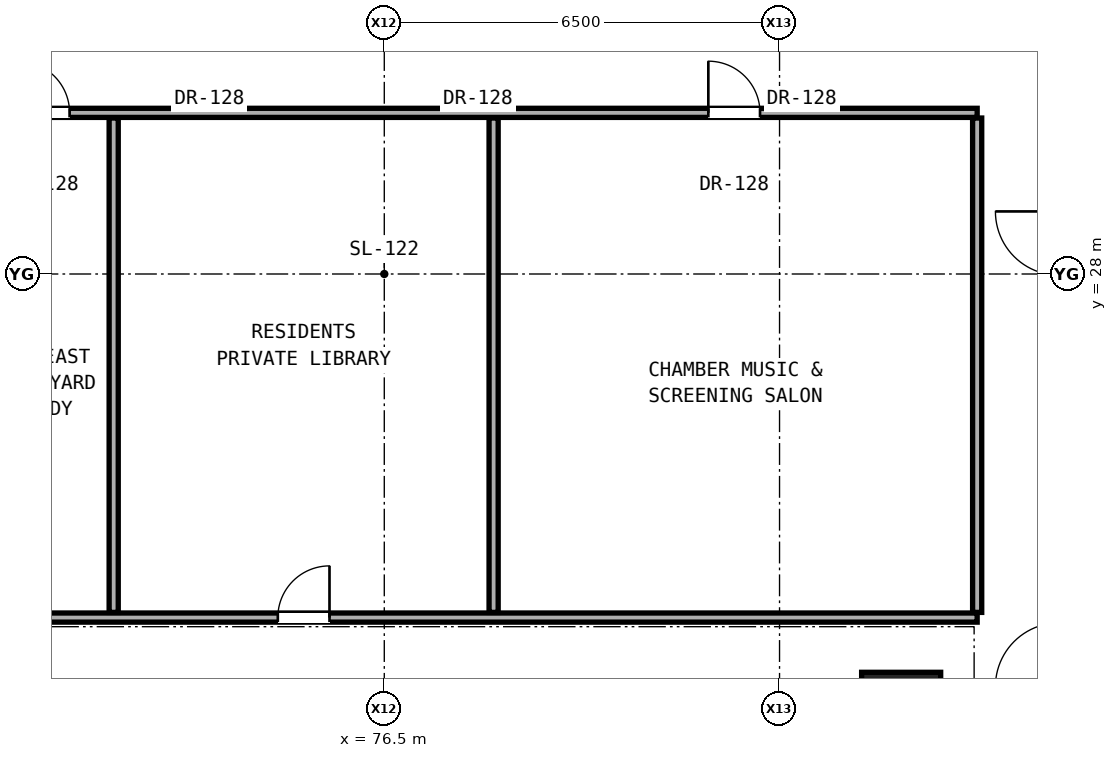
"""IFC4 building model, lengths in metres.
Left out: names, types, materials, properties, quantities, classifications, styles, units other than length and angle.
Written with IfcOpenShell. Run it as: python <this file> out.ifc"""

import sys

from ifc_helpers import new_model, si_unit, direction, frame, frame_2d, origin, origin_2d, place, context, subcontext, project, spatial, rectangle, extrude, element, fill, save


model = new_model("IFC4")
c1 = context("Model", 3, precision=1e-05, world=origin(), true_north=direction((0.0, 1.0)))
c2 = subcontext(c1, "Body", "Model", "MODEL_VIEW")
j1 = project(units=[si_unit("LENGTHUNIT", "METRE"), si_unit("PLANEANGLEUNIT", "RADIAN")], contexts=[c1])
p1 = place(None, origin())
s1 = spatial("IfcSite", under=j1, at=p1, CompositionType="ELEMENT")
p2 = place(p1, origin())
s2 = spatial("IfcBuilding", under=s1, at=p2, CompositionType="ELEMENT")
p3 = place(p2, frame((0.0, 0.0, 55.4)))
s3 = spatial("IfcBuildingStorey", under=s2, at=p3, CompositionType="ELEMENT", Elevation=55.4)
p4 = place(p3, frame((85.0, 20.8, 0.0), z_axis=(0.0, 0.0, 1.0), x_axis=(1.0, 0.0, 0.0)))
e1 = element("IfcColumn", 1, at=p4, inside=s3, PredefinedType="COLUMN", context=c2, shape_type="SweptSolid", body=[
    extrude(rectangle(XDim=1.3, YDim=1.3, at=origin_2d()), origin(), (0.0, 0.0, 1.0), 3.3),
])
p5 = place(p3, frame((66.62, 22.35, 0.0), z_axis=(0.0, 0.0, 1.0), x_axis=(1.0, 0.0, 0.0)))
e2 = element("IfcWall", 2, at=p5, inside=s3, PredefinedType="PARTITIONING", context=c2, shape_type="SweptSolid", body=[
    extrude(rectangle(XDim=19.63, YDim=0.15, at=frame_2d((9.815, 0.0))), origin(), (0.0, 0.0, 1.0), 2.125),
])
p6 = place(p5, frame((8.129, 0.0, 0.0)))
e3 = element("IfcOpeningElement", 3, at=p6, cuts=e2, PredefinedType="OPENING", context=c2, shape_type="SweptSolid", body=[
    extrude(rectangle(XDim=0.85, YDim=2.01, at=frame_2d((0.425, 1.005))), frame((0.0, 0.085, 0.0), z_axis=(0.0, -1.0, 0.0), x_axis=(1.0, 0.0, 0.0)), (0.0, 0.0, 1.0), 0.17),
])
p7 = place(p3, frame((66.62, 30.65, 0.0), z_axis=(0.0, 0.0, 1.0), x_axis=(1.0, 0.0, 0.0)))
e4 = element("IfcWall", 4, at=p7, inside=s3, PredefinedType="PARTITIONING", context=c2, shape_type="SweptSolid", body=[
    extrude(rectangle(XDim=19.63, YDim=0.15, at=frame_2d((9.815, 0.0))), origin(), (0.0, 0.0, 1.0), 2.125),
])
p8 = place(p7, frame((3.855, 0.0, 0.0)))
e5 = element("IfcOpeningElement", 5, at=p8, cuts=e4, PredefinedType="OPENING", context=c2, shape_type="SweptSolid", body=[
    extrude(rectangle(XDim=0.85, YDim=2.01, at=frame_2d((0.425, 1.005))), frame((0.0, 0.085, 0.0), z_axis=(0.0, -1.0, 0.0), x_axis=(1.0, 0.0, 0.0)), (0.0, 0.0, 1.0), 0.17),
])
p9 = place(p7, frame((15.209, 0.0, 0.0)))
e6 = element("IfcOpeningElement", 6, at=p9, cuts=e4, PredefinedType="OPENING", context=c2, shape_type="SweptSolid", body=[
    extrude(rectangle(XDim=0.85, YDim=2.01, at=frame_2d((0.425, 1.005))), frame((0.0, 0.085, 0.0), z_axis=(0.0, -1.0, 0.0), x_axis=(1.0, 0.0, 0.0)), (0.0, 0.0, 1.0), 0.17),
])
for number, where, z_axis, x_axis in (
    (7, (72.05, 22.435, 0.0), (0.0, 0.0, 1.0), (0.0, 1.0, 0.0)),
    (8, (78.298, 22.435, 0.0), (0.0, 0.0, 1.0), (0.0, 1.0, 0.0)),
):
    element("IfcWall", number, at=place(p3, frame(where, z_axis=z_axis, x_axis=x_axis)), inside=s3, PredefinedType="PARTITIONING", context=c2, shape_type="SweptSolid", body=[
        extrude(rectangle(XDim=8.13, YDim=0.15, at=frame_2d((4.065, 0.0))), origin(), (0.0, 0.0, 1.0), 2.125),
    ])
p10 = place(p3, frame((86.25, 22.435, 0.0), z_axis=(0.0, 0.0, 1.0), x_axis=(0.0, 1.0, 0.0)))
e9 = element("IfcWall", 9, at=p10, inside=s3, PredefinedType="PARTITIONING", context=c2, shape_type="SweptSolid", body=[
    extrude(rectangle(XDim=8.13, YDim=0.15, at=frame_2d((4.065, 0.0))), origin(), (0.0, 0.0, 1.0), 2.279),
])
p11 = place(p8, origin())
e10 = element("IfcDoor", 10, at=p11, inside=s3, OperationType="SINGLE_SWING_LEFT", PredefinedType="DOOR", context=c2, shape_type="SweptSolid", body=[
    extrude(rectangle(XDim=0.85, YDim=2.01, at=frame_2d((0.425, 1.005))), frame((0.0, 0.025, 0.0), z_axis=(0.0, -1.0, 0.0), x_axis=(1.0, 0.0, 0.0)), (0.0, 0.0, 1.0), 0.05),
])
fill(e5, e10)
p12 = place(p6, origin())
e11 = element("IfcDoor", 11, at=p12, inside=s3, OperationType="SINGLE_SWING_RIGHT", PredefinedType="DOOR", context=c2, shape_type="SweptSolid", body=[
    extrude(rectangle(XDim=0.85, YDim=2.01, at=frame_2d((0.425, 1.005))), frame((0.0, 0.025, 0.0), z_axis=(0.0, -1.0, 0.0), x_axis=(1.0, 0.0, 0.0)), (0.0, 0.0, 1.0), 0.05),
])
fill(e3, e11)
p13 = place(p9, origin())
e12 = element("IfcDoor", 12, at=p13, inside=s3, OperationType="SINGLE_SWING_LEFT", PredefinedType="DOOR", context=c2, shape_type="SweptSolid", body=[
    extrude(rectangle(XDim=0.85, YDim=2.01, at=frame_2d((0.425, 1.005))), frame((0.0, 0.025, 0.0), z_axis=(0.0, -1.0, 0.0), x_axis=(1.0, 0.0, 0.0)), (0.0, 0.0, 1.0), 0.05),
])
fill(e6, e12)
save(model, sys.argv[1])
